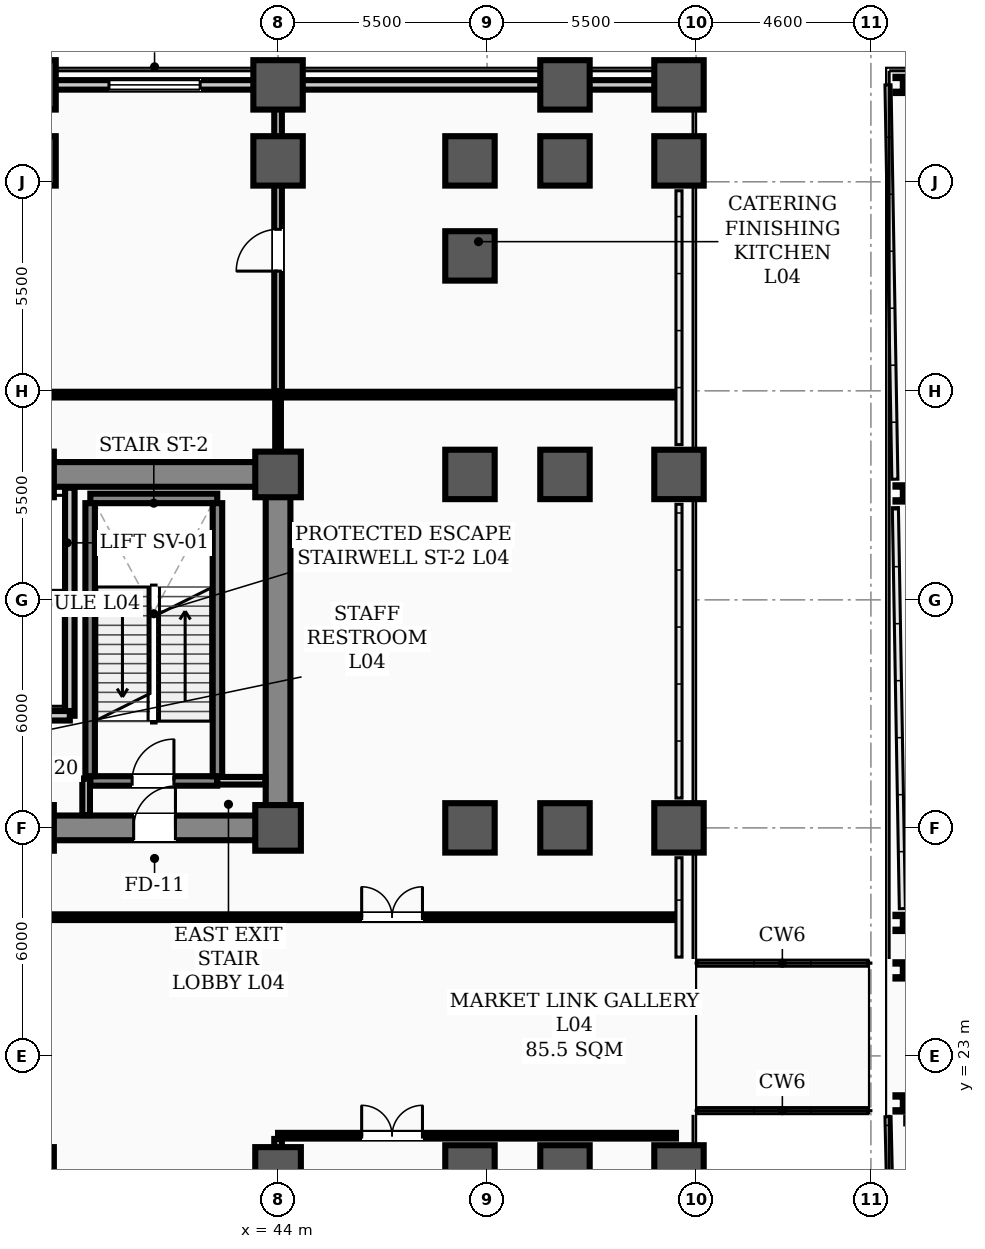
"""IFC4 building model, lengths in metres.
Left out: names, types, materials, properties, quantities, classifications, styles, units other than length and angle.
Written with IfcOpenShell. Run it as: python <this file> out.ifc"""

import sys

from ifc_helpers import new_model, si_unit, direction, frame, frame_2d, origin, origin_2d, place, context, subcontext, project, spatial, rectangle, hollow_rectangle, i_section, extrude, element, fill, save


model = new_model("IFC4")
c1 = context("Model", 3, precision=1e-05, world=origin(), true_north=direction((0.0, 1.0)))
c2 = subcontext(c1, "Body", "Model", "MODEL_VIEW")
j1 = project(units=[si_unit("LENGTHUNIT", "METRE"), si_unit("PLANEANGLEUNIT", "RADIAN")], contexts=[c1])
p1 = place(None, origin())
s1 = spatial("IfcSite", under=j1, at=p1, CompositionType="ELEMENT")
p2 = place(p1, origin())
s2 = spatial("IfcBuilding", under=s1, at=p2, CompositionType="ELEMENT")
p3 = place(p2, frame((0.0, 0.0, 16.6)))
s3 = spatial("IfcBuildingStorey", under=s2, at=p3, CompositionType="ELEMENT", Elevation=16.6)
for number, where, z_axis, x_axis in (
    (1, (37.5, 29.0, 0.0), (0.0, 0.0, 1.0), (1.0, 0.0, 0.0)),
    (2, (37.5, 38.3, 0.0), (0.0, 0.0, 1.0), (1.0, 0.0, 0.0)),
    (3, (44.0, 29.0, 0.0), (0.0, 0.0, 1.0), (1.0, 0.0, 0.0)),
    (4, (44.0, 38.3, 0.0), (0.0, 0.0, 1.0), (1.0, 0.0, 0.0)),
    (5, (37.5, 20.0, 0.0), (0.0, 0.0, 1.0), (1.0, 0.0, 0.0)),
    (6, (44.0, 20.0, 0.0), (0.0, 0.0, 1.0), (1.0, 0.0, 0.0)),
):
    element("IfcColumn", number, at=place(p3, frame(where, z_axis=z_axis, x_axis=x_axis)), inside=s3, PredefinedType="COLUMN", context=c2, shape_type="SweptSolid", body=[
        extrude(hollow_rectangle(XDim=1.2, YDim=1.2, WallThickness=0.04, InnerFilletRadius=0.02, OuterFilletRadius=0.06, at=origin_2d()), origin(), (0.0, 0.0, 1.0), 5.4),
    ])
p4 = place(p3, frame((37.5, 46.55, 0.0), z_axis=(0.0, 0.0, 1.0), x_axis=(1.0, 0.0, 0.0)))
e7 = element("IfcColumn", 7, at=p4, inside=s3, PredefinedType="COLUMN", context=c2, shape_type="SweptSolid", body=[
    extrude(rectangle(XDim=1.3, YDim=1.3, at=origin_2d()), origin(), (0.0, 0.0, 1.0), 5.4),
])
p5 = place(p3, frame((37.5, 48.55, 0.0), z_axis=(0.0, 0.0, 1.0), x_axis=(1.0, 0.0, 0.0)))
e8 = element("IfcColumn", 8, at=p5, inside=s3, PredefinedType="COLUMN", context=c2, shape_type="SweptSolid", body=[
    extrude(rectangle(XDim=1.3, YDim=1.3, at=origin_2d()), origin(), (0.0, 0.0, 1.0), 5.16),
])
p6 = place(p3, frame((44.0, 46.55, 0.0), z_axis=(0.0, 0.0, 1.0), x_axis=(1.0, 0.0, 0.0)))
e9 = element("IfcColumn", 9, at=p6, inside=s3, PredefinedType="COLUMN", context=c2, shape_type="SweptSolid", body=[
    extrude(rectangle(XDim=1.3, YDim=1.3, at=origin_2d()), origin(), (0.0, 0.0, 1.0), 5.4),
])
p7 = place(p3, frame((44.0, 48.55, 0.0), z_axis=(0.0, 0.0, 1.0), x_axis=(1.0, 0.0, 0.0)))
e10 = element("IfcColumn", 10, at=p7, inside=s3, PredefinedType="COLUMN", context=c2, shape_type="SweptSolid", body=[
    extrude(rectangle(XDim=1.3, YDim=1.3, at=origin_2d()), origin(), (0.0, 0.0, 1.0), 5.16),
])
for number, where, z_axis, x_axis in (
    (11, (49.05, 20.0, 0.0), (0.0, 0.0, 1.0), (1.0, 0.0, 0.0)),
    (12, (49.05, 29.0, 0.0), (0.0, 0.0, 1.0), (1.0, 0.0, 0.0)),
    (13, (49.05, 38.3, 0.0), (0.0, 0.0, 1.0), (1.0, 0.0, 0.0)),
    (14, (49.05, 44.05, 0.0), (0.0, 0.0, 1.0), (1.0, 0.0, 0.0)),
    (15, (49.05, 46.55, 0.0), (0.0, 0.0, 1.0), (1.0, 0.0, 0.0)),
    (16, (51.55, 20.0, 0.0), (0.0, 0.0, 1.0), (1.0, 0.0, 0.0)),
    (17, (51.55, 29.0, 0.0), (0.0, 0.0, 1.0), (1.0, 0.0, 0.0)),
    (18, (51.55, 38.3, 0.0), (0.0, 0.0, 1.0), (1.0, 0.0, 0.0)),
    (19, (51.55, 46.55, 0.0), (0.0, 0.0, 1.0), (1.0, 0.0, 0.0)),
):
    element("IfcColumn", number, at=place(p3, frame(where, z_axis=z_axis, x_axis=x_axis)), inside=s3, PredefinedType="COLUMN", context=c2, shape_type="SweptSolid", body=[
        extrude(rectangle(XDim=1.3, YDim=1.3, at=origin_2d()), origin(), (0.0, 0.0, 1.0), 5.4),
    ])
for number, where, z_axis, x_axis in (
    (20, (51.55, 48.55, 0.0), (0.0, 0.0, 1.0), (1.0, 0.0, 0.0)),
    (21, (54.55, 20.0, 0.0), (0.0, 0.0, 1.0), (1.0, 0.0, 0.0)),
    (22, (54.55, 29.0, 0.0), (0.0, 0.0, 1.0), (1.0, 0.0, 0.0)),
    (23, (54.55, 38.3, 0.0), (0.0, 0.0, 1.0), (1.0, 0.0, 0.0)),
    (24, (54.55, 46.55, 0.0), (0.0, 0.0, 1.0), (1.0, 0.0, 0.0)),
    (25, (54.55, 48.55, 0.0), (0.0, 0.0, 1.0), (1.0, 0.0, 0.0)),
):
    element("IfcColumn", number, at=place(p3, frame(where, z_axis=z_axis, x_axis=x_axis)), inside=s3, PredefinedType="COLUMN", context=c2, shape_type="SweptSolid", body=[
        extrude(rectangle(XDim=1.3, YDim=1.3, at=origin_2d()), origin(), (0.0, 0.0, 1.0), 5.16),
    ])
for number, where, z_axis, x_axis in (
    (26, (60.45, 21.75, 0.0), (0.0, 0.0, 1.0), (1.0, 0.0, 0.0)),
    (27, (60.45, 25.25, 0.0), (0.0, 0.0, 1.0), (1.0, 0.0, 0.0)),
    (28, (60.45, 26.5, 0.0), (0.0, 0.0, 1.0), (1.0, 0.0, 0.0)),
    (29, (60.45, 37.8, 0.0), (0.0, 0.0, 1.0), (1.0, 0.0, 0.0)),
    (30, (60.45, 48.55, 0.0), (0.0, 0.0, 1.0), (1.0, 0.0, 0.0)),
):
    element("IfcColumn", number, at=place(p3, frame(where, z_axis=z_axis, x_axis=x_axis)), inside=s3, PredefinedType="COLUMN", context=c2, shape_type="SweptSolid", body=[
        extrude(i_section(OverallWidth=0.407, OverallDepth=0.428, WebThickness=0.02, FlangeThickness=0.035, FilletRadius=0.022, at=origin_2d()), origin(), (0.0, 0.0, 1.0), 5.4),
    ])
p8 = place(p3, frame((0.45, 48.55, 0.0), z_axis=(0.0, 0.0, 1.0), x_axis=(1.0, 0.0, 0.0)))
e31 = element("IfcWall", 31, at=p8, inside=s3, PredefinedType="STANDARD", context=c2, shape_type="SweptSolid", body=[
    extrude(rectangle(XDim=54.1, YDim=0.25, at=frame_2d((27.05, 0.0))), origin(), (0.0, 0.0, 1.0), 4.38),
])
p9 = place(p8, frame((7.25, 0.0, 0.9)))
e32 = element("IfcOpeningElement", 32, at=p9, cuts=e31, PredefinedType="OPENING", context=c2, shape_type="SweptSolid", body=[
    extrude(rectangle(XDim=3.0, YDim=2.2, at=frame_2d((1.5, 1.1))), frame((0.0, 0.135, 0.0), z_axis=(0.0, -1.0, 0.0), x_axis=(1.0, 0.0, 0.0)), (0.0, 0.0, 1.0), 0.27),
])
p10 = place(p8, frame((17.15, 0.0, 0.9)))
e33 = element("IfcOpeningElement", 33, at=p10, cuts=e31, PredefinedType="OPENING", context=c2, shape_type="SweptSolid", body=[
    extrude(rectangle(XDim=2.4, YDim=2.1, at=frame_2d((1.2, 1.05))), frame((0.0, 0.135, 0.0), z_axis=(0.0, -1.0, 0.0), x_axis=(1.0, 0.0, 0.0)), (0.0, 0.0, 1.0), 0.27),
])
p11 = place(p8, frame((32.6, 0.0, 0.9)))
e34 = element("IfcOpeningElement", 34, at=p11, cuts=e31, PredefinedType="OPENING", context=c2, shape_type="SweptSolid", body=[
    extrude(rectangle(XDim=2.4, YDim=2.1, at=frame_2d((1.2, 1.05))), frame((0.0, 0.135, 0.0), z_axis=(0.0, -1.0, 0.0), x_axis=(1.0, 0.0, 0.0)), (0.0, 0.0, 1.0), 0.27),
])
p12 = place(p8, frame((39.1, 0.0, 0.9)))
e35 = element("IfcOpeningElement", 35, at=p12, cuts=e31, PredefinedType="OPENING", context=c2, shape_type="SweptSolid", body=[
    extrude(rectangle(XDim=2.4, YDim=2.1, at=frame_2d((1.2, 1.05))), frame((0.0, 0.135, 0.0), z_axis=(0.0, -1.0, 0.0), x_axis=(1.0, 0.0, 0.0)), (0.0, 0.0, 1.0), 0.27),
])
p13 = place(p3, frame((60.45, 48.55, 0.0), z_axis=(0.0, 0.0, 1.0), x_axis=(1.0, 0.0, 0.0)))
e36 = element("IfcWall", 36, at=p13, inside=s3, PredefinedType="STANDARD", context=c2, shape_type="SweptSolid", body=[
    extrude(rectangle(XDim=16.7, YDim=0.25, at=frame_2d((8.35, 0.0))), origin(), (0.0, 0.0, 1.0), 4.51),
])
p14 = place(p13, frame((2.85, 0.0, 0.95)))
e37 = element("IfcOpeningElement", 37, at=p14, cuts=e36, PredefinedType="OPENING", context=c2, shape_type="SweptSolid", body=[
    extrude(rectangle(XDim=2.0, YDim=1.8, at=frame_2d((1.0, 0.9))), frame((0.0, 0.135, 0.0), z_axis=(0.0, -1.0, 0.0), x_axis=(1.0, 0.0, 0.0)), (0.0, 0.0, 1.0), 0.27),
])
p15 = place(p13, frame((11.35, 0.0, 0.95)))
e38 = element("IfcOpeningElement", 38, at=p15, cuts=e36, PredefinedType="OPENING", context=c2, shape_type="SweptSolid", body=[
    extrude(rectangle(XDim=2.0, YDim=1.8, at=frame_2d((1.0, 0.9))), frame((0.0, 0.135, 0.0), z_axis=(0.0, -1.0, 0.0), x_axis=(1.0, 0.0, 0.0)), (0.0, 0.0, 1.0), 0.27),
])
p16 = place(p3, frame((13.5, 29.0, 0.0), z_axis=(0.0, 0.0, 1.0), x_axis=(1.0, 0.0, 0.0)))
e39 = element("IfcWall", 39, at=p16, inside=s3, PredefinedType="SHEAR", context=c2, shape_type="SweptSolid", body=[
    extrude(rectangle(XDim=30.5, YDim=0.65, at=frame_2d((15.25, 0.0))), origin(), (0.0, 0.0, 1.0), 5.16),
])
p17 = place(p16, frame((1.75, 0.0, 0.0)))
e40 = element("IfcOpeningElement", 40, at=p17, cuts=e39, PredefinedType="OPENING", context=c2, shape_type="SweptSolid", body=[
    extrude(rectangle(XDim=1.1, YDim=2.08, at=frame_2d((0.55, 1.04))), frame((0.0, 0.335, 0.0), z_axis=(0.0, -1.0, 0.0), x_axis=(1.0, 0.0, 0.0)), (0.0, 0.0, 1.0), 0.67),
])
p18 = place(p16, frame((26.7, 0.0, 0.0)))
e41 = element("IfcOpeningElement", 41, at=p18, cuts=e39, PredefinedType="OPENING", context=c2, shape_type="SweptSolid", body=[
    extrude(rectangle(XDim=1.1, YDim=2.08, at=frame_2d((0.55, 1.04))), frame((0.0, 0.335, 0.0), z_axis=(0.0, -1.0, 0.0), x_axis=(1.0, 0.0, 0.0)), (0.0, 0.0, 1.0), 0.67),
])
p19 = place(p16, frame((6.8, 0.0, 0.0)))
e42 = element("IfcOpeningElement", 42, at=p19, cuts=e39, PredefinedType="OPENING", context=c2, shape_type="SweptSolid", body=[
    extrude(rectangle(XDim=1.1, YDim=2.08, at=frame_2d((0.55, 1.04))), frame((0.0, 0.335, 0.0), z_axis=(0.0, -1.0, 0.0), x_axis=(1.0, 0.0, 0.0)), (0.0, 0.0, 1.0), 0.67),
])
p20 = place(p16, frame((13.2, 0.0, 0.0)))
e43 = element("IfcOpeningElement", 43, at=p20, cuts=e39, PredefinedType="OPENING", context=c2, shape_type="SweptSolid", body=[
    extrude(rectangle(XDim=1.6, YDim=2.08, at=frame_2d((0.8, 1.04))), frame((0.0, 0.335, 0.0), z_axis=(0.0, -1.0, 0.0), x_axis=(1.0, 0.0, 0.0)), (0.0, 0.0, 1.0), 0.67),
])
p21 = place(p16, frame((19.53, 0.0, 0.0)))
e44 = element("IfcOpeningElement", 44, at=p21, cuts=e39, PredefinedType="OPENING", context=c2, shape_type="SweptSolid", body=[
    extrude(rectangle(XDim=0.9, YDim=2.08, at=frame_2d((0.45, 1.04))), frame((0.0, 0.335, 0.0), z_axis=(0.0, -1.0, 0.0), x_axis=(1.0, 0.0, 0.0)), (0.0, 0.0, 1.0), 0.67),
])
p22 = place(p16, frame((21.57, 0.0, 0.0)))
e45 = element("IfcOpeningElement", 45, at=p22, cuts=e39, PredefinedType="OPENING", context=c2, shape_type="SweptSolid", body=[
    extrude(rectangle(XDim=0.9, YDim=2.08, at=frame_2d((0.45, 1.04))), frame((0.0, 0.335, 0.0), z_axis=(0.0, -1.0, 0.0), x_axis=(1.0, 0.0, 0.0)), (0.0, 0.0, 1.0), 0.67),
])
p23 = place(p3, frame((13.5, 38.3, 0.0), z_axis=(0.0, 0.0, 1.0), x_axis=(1.0, 0.0, 0.0)))
e46 = element("IfcWall", 46, at=p23, inside=s3, PredefinedType="SHEAR", context=c2, shape_type="SweptSolid", body=[
    extrude(rectangle(XDim=30.5, YDim=0.65, at=frame_2d((15.25, 0.0))), origin(), (0.0, 0.0, 1.0), 5.16),
])
p24 = place(p3, frame((44.0, 29.35, 0.0), z_axis=(0.0, 0.0, 1.0), x_axis=(0.0, 1.0, 0.0)))
e47 = element("IfcWall", 47, at=p24, inside=s3, PredefinedType="SHEAR", context=c2, shape_type="SweptSolid", body=[
    extrude(rectangle(XDim=8.6, YDim=0.65, at=frame_2d((4.3, 0.0))), origin(), (0.0, 0.0, 1.0), 5.16),
])
p25 = place(p3, frame((39.06, 30.235, 0.0), z_axis=(0.0, 0.0, 1.0), x_axis=(1.0, 0.0, 0.0)))
e48 = element("IfcWall", 48, at=p25, inside=s3, PredefinedType="STANDARD", context=c2, shape_type="SweptSolid", body=[
    extrude(rectangle(XDim=3.34, YDim=0.25, at=frame_2d((1.67, 0.0))), origin(), (0.0, 0.0, 1.0), 5.16),
])
p26 = place(p25, frame((1.1, 0.0, 0.0)))
e49 = element("IfcOpeningElement", 49, at=p26, cuts=e48, PredefinedType="OPENING", context=c2, shape_type="SweptSolid", body=[
    extrude(rectangle(XDim=1.1, YDim=2.08, at=frame_2d((0.55, 1.04))), frame((0.0, 0.135, 0.0), z_axis=(0.0, -1.0, 0.0), x_axis=(1.0, 0.0, 0.0)), (0.0, 0.0, 1.0), 0.27),
])
p27 = place(p3, frame((39.06, 37.669, 0.0), z_axis=(0.0, 0.0, 1.0), x_axis=(1.0, 0.0, 0.0)))
e50 = element("IfcWall", 50, at=p27, inside=s3, PredefinedType="STANDARD", context=c2, shape_type="SweptSolid", body=[
    extrude(rectangle(XDim=3.34, YDim=0.25, at=frame_2d((1.67, 0.0))), origin(), (0.0, 0.0, 1.0), 5.16),
])
for number, where, z_axis, x_axis in (
    (51, (39.055, 30.36, 0.0), (0.0, 0.0, 1.0), (0.0, 1.0, 0.0)),
    (52, (42.405, 30.36, 0.0), (0.0, 0.0, 1.0), (0.0, 1.0, 0.0)),
):
    element("IfcWall", number, at=place(p3, frame(where, z_axis=z_axis, x_axis=x_axis)), inside=s3, PredefinedType="STANDARD", context=c2, shape_type="SweptSolid", body=[
        extrude(rectangle(XDim=7.184, YDim=0.25, at=frame_2d((3.592, 0.0))), origin(), (0.0, 0.0, 1.0), 5.16),
    ])
p28 = place(p3, frame((38.52, 31.95, 0.0), z_axis=(0.0, 0.0, 1.0), x_axis=(0.0, 1.0, 0.0)))
e53 = element("IfcWall", 53, at=p28, inside=s3, PredefinedType="STANDARD", context=c2, shape_type="SweptSolid", body=[
    extrude(rectangle(XDim=6.0, YDim=0.25, at=frame_2d((3.0, 0.0))), origin(), (0.0, 0.0, 1.0), 3.74),
])
p29 = place(p3, frame((36.62, 31.95, 0.0), z_axis=(0.0, 0.0, 1.0), x_axis=(1.0, 0.0, 0.0)))
e54 = element("IfcWall", 54, at=p29, inside=s3, PredefinedType="STANDARD", context=c2, shape_type="SweptSolid", body=[
    extrude(rectangle(XDim=1.9, YDim=0.25, at=frame_2d((0.95, 0.0))), origin(), (0.0, 0.0, 1.0), 4.98),
])
p30 = place(p3, frame((0.58, 26.65, 0.0), z_axis=(0.0, 0.0, 1.0), x_axis=(1.0, 0.0, 0.0)))
e55 = element("IfcWall", 55, at=p30, inside=s3, PredefinedType="PARTITIONING", context=c2, shape_type="SweptSolid", body=[
    extrude(rectangle(XDim=53.89, YDim=0.15, at=frame_2d((26.945, 0.0))), origin(), (0.0, 0.0, 1.0), 3.74),
])
p31 = place(p30, frame((17.12, 0.0, 0.0)))
e56 = element("IfcOpeningElement", 56, at=p31, cuts=e55, PredefinedType="OPENING", context=c2, shape_type="SweptSolid", body=[
    extrude(rectangle(XDim=1.6, YDim=2.08, at=frame_2d((0.8, 1.04))), frame((0.0, 0.085, 0.0), z_axis=(0.0, -1.0, 0.0), x_axis=(1.0, 0.0, 0.0)), (0.0, 0.0, 1.0), 0.17),
])
p32 = place(p30, frame((32.87, 0.0, 0.0)))
e57 = element("IfcOpeningElement", 57, at=p32, cuts=e55, PredefinedType="OPENING", context=c2, shape_type="SweptSolid", body=[
    extrude(rectangle(XDim=1.6, YDim=2.08, at=frame_2d((0.8, 1.04))), frame((0.0, 0.085, 0.0), z_axis=(0.0, -1.0, 0.0), x_axis=(1.0, 0.0, 0.0)), (0.0, 0.0, 1.0), 0.17),
])
p33 = place(p30, frame((45.62, 0.0, 0.0)))
e58 = element("IfcOpeningElement", 58, at=p33, cuts=e55, PredefinedType="OPENING", context=c2, shape_type="SweptSolid", body=[
    extrude(rectangle(XDim=1.6, YDim=2.08, at=frame_2d((0.8, 1.04))), frame((0.0, 0.085, 0.0), z_axis=(0.0, -1.0, 0.0), x_axis=(1.0, 0.0, 0.0)), (0.0, 0.0, 1.0), 0.17),
])
p34 = place(p3, frame((44.0, 20.9, 0.0), z_axis=(0.0, 0.0, 1.0), x_axis=(1.0, 0.0, 0.0)))
e59 = element("IfcWall", 59, at=p34, inside=s3, PredefinedType="PARTITIONING", context=c2, shape_type="SweptSolid", body=[
    extrude(rectangle(XDim=10.47, YDim=0.15, at=frame_2d((5.235, 0.0))), origin(), (0.0, 0.0, 1.0), 3.74),
])
p35 = place(p34, frame((2.2, 0.0, 0.0)))
e60 = element("IfcOpeningElement", 60, at=p35, cuts=e59, PredefinedType="OPENING", context=c2, shape_type="SweptSolid", body=[
    extrude(rectangle(XDim=1.6, YDim=2.08, at=frame_2d((0.8, 1.04))), frame((0.0, 0.085, 0.0), z_axis=(0.0, -1.0, 0.0), x_axis=(1.0, 0.0, 0.0)), (0.0, 0.0, 1.0), 0.17),
])
p36 = place(p3, frame((0.58, 40.4, 0.0), z_axis=(0.0, 0.0, 1.0), x_axis=(1.0, 0.0, 0.0)))
e61 = element("IfcWall", 61, at=p36, inside=s3, PredefinedType="PARTITIONING", context=c2, shape_type="SweptSolid", body=[
    extrude(rectangle(XDim=53.89, YDim=0.15, at=frame_2d((26.945, 0.0))), origin(), (0.0, 0.0, 1.0), 3.74),
])
p37 = place(p36, frame((17.12, 0.0, 0.0)))
e62 = element("IfcOpeningElement", 62, at=p37, cuts=e61, PredefinedType="OPENING", context=c2, shape_type="SweptSolid", body=[
    extrude(rectangle(XDim=1.6, YDim=2.08, at=frame_2d((0.8, 1.04))), frame((0.0, 0.085, 0.0), z_axis=(0.0, -1.0, 0.0), x_axis=(1.0, 0.0, 0.0)), (0.0, 0.0, 1.0), 0.17),
])
p38 = place(p36, frame((32.87, 0.0, 0.0)))
e63 = element("IfcOpeningElement", 63, at=p38, cuts=e61, PredefinedType="OPENING", context=c2, shape_type="SweptSolid", body=[
    extrude(rectangle(XDim=1.6, YDim=2.08, at=frame_2d((0.8, 1.04))), frame((0.0, 0.085, 0.0), z_axis=(0.0, -1.0, 0.0), x_axis=(1.0, 0.0, 0.0)), (0.0, 0.0, 1.0), 0.17),
])
p39 = place(p3, frame((42.4, 30.24, 0.0), z_axis=(0.0, 0.0, 1.0), x_axis=(1.0, 0.0, 0.0)))
e64 = element("IfcWall", 64, at=p39, inside=s3, PredefinedType="STANDARD", context=c2, shape_type="SweptSolid", body=[
    extrude(rectangle(XDim=1.265, YDim=0.2, at=frame_2d((0.633, 0.0))), origin(), (0.0, 0.0, 1.0), 3.74),
])
p40 = place(p3, frame((44.0, 3.53, 0.0), z_axis=(0.0, 0.0, 1.0), x_axis=(0.0, 1.0, 0.0)))
e65 = element("IfcWall", 65, at=p40, inside=s3, PredefinedType="STANDARD", context=c2, shape_type="SweptSolid", body=[
    extrude(rectangle(XDim=17.285, YDim=0.2, at=frame_2d((8.643, 0.0))), origin(), (0.0, 0.0, 1.0), 3.74),
])
p41 = place(p3, frame((44.0, 40.485, 0.0), z_axis=(0.0, 0.0, 1.0), x_axis=(0.0, 1.0, 0.0)))
e66 = element("IfcWall", 66, at=p41, inside=s3, PredefinedType="STANDARD", context=c2, shape_type="SweptSolid", body=[
    extrude(rectangle(XDim=7.935, YDim=0.2, at=frame_2d((3.967, 0.0))), origin(), (0.0, 0.0, 1.0), 3.74),
])
p42 = place(p41, frame((3.165, 0.0, 0.0)))
e67 = element("IfcOpeningElement", 67, at=p42, cuts=e66, PredefinedType="OPENING", context=c2, shape_type="SweptSolid", body=[
    extrude(rectangle(XDim=1.1, YDim=2.08, at=frame_2d((0.55, 1.04))), frame((0.0, 0.11, 0.0), z_axis=(0.0, -1.0, 0.0), x_axis=(1.0, 0.0, 0.0)), (0.0, 0.0, 1.0), 0.22),
])
p43 = place(p3, frame((44.0, 38.635, 0.0), z_axis=(0.0, 0.0, 1.0), x_axis=(0.0, 1.0, 0.0)))
e68 = element("IfcWall", 68, at=p43, inside=s3, PredefinedType="PARTITIONING", context=c2, shape_type="SweptSolid", body=[
    extrude(rectangle(XDim=1.68, YDim=0.15, at=frame_2d((0.84, 0.0))), origin(), (0.0, 0.0, 1.0), 3.74),
])
p44 = place(p3, frame((38.95, 29.335, 0.0), z_axis=(0.0, 0.0, 1.0), x_axis=(0.0, 1.0, 0.0)))
e69 = element("IfcWall", 69, at=p44, inside=s3, PredefinedType="STANDARD", context=c2, shape_type="SweptSolid", body=[
    extrude(rectangle(XDim=0.965, YDim=0.2, at=frame_2d((0.482, 0.0))), origin(), (0.0, 0.0, 1.0), 3.74),
])
p45 = place(p12, origin())
e70 = element("IfcWindow", 70, at=p45, inside=s3, PartitioningType="SINGLE_PANEL", PredefinedType="WINDOW", context=c2, shape_type="SweptSolid", body=[
    extrude(rectangle(XDim=2.4, YDim=2.1, at=frame_2d((1.2, 1.05))), frame((0.0, 0.03, 0.0), z_axis=(0.0, -1.0, 0.0), x_axis=(1.0, 0.0, 0.0)), (0.0, 0.0, 1.0), 0.06),
])
fill(e35, e70)
p46 = place(p26, origin())
e71 = element("IfcDoor", 71, at=p46, inside=s3, OperationType="SINGLE_SWING_RIGHT", PredefinedType="DOOR", context=c2, shape_type="SweptSolid", body=[
    extrude(rectangle(XDim=1.1, YDim=2.08, at=frame_2d((0.55, 1.04))), frame((0.0, 0.025, 0.0), z_axis=(0.0, -1.0, 0.0), x_axis=(1.0, 0.0, 0.0)), (0.0, 0.0, 1.0), 0.05),
])
fill(e49, e71)
p47 = place(p35, origin())
e72 = element("IfcDoor", 72, at=p47, inside=s3, OperationType="DOUBLE_DOOR_SINGLE_SWING", PredefinedType="DOOR", context=c2, shape_type="SweptSolid", body=[
    extrude(rectangle(XDim=1.6, YDim=2.08, at=frame_2d((0.8, 1.04))), frame((0.0, 0.025, 0.0), z_axis=(0.0, -1.0, 0.0), x_axis=(1.0, 0.0, 0.0)), (0.0, 0.0, 1.0), 0.05),
])
fill(e60, e72)
p48 = place(p33, origin())
e73 = element("IfcDoor", 73, at=p48, inside=s3, OperationType="DOUBLE_DOOR_SINGLE_SWING", PredefinedType="DOOR", context=c2, shape_type="SweptSolid", body=[
    extrude(rectangle(XDim=1.6, YDim=2.08, at=frame_2d((0.8, 1.04))), frame((0.0, 0.025, 0.0), z_axis=(0.0, -1.0, 0.0), x_axis=(1.0, 0.0, 0.0)), (0.0, 0.0, 1.0), 0.05),
])
fill(e58, e73)
p49 = place(p42, origin())
e74 = element("IfcDoor", 74, at=p49, inside=s3, OperationType="SINGLE_SWING_LEFT", PredefinedType="DOOR", context=c2, shape_type="SweptSolid", body=[
    extrude(rectangle(XDim=1.1, YDim=2.08, at=frame_2d((0.55, 1.04))), frame((0.0, 0.025, 0.0), z_axis=(0.0, -1.0, 0.0), x_axis=(1.0, 0.0, 0.0)), (0.0, 0.0, 1.0), 0.05),
])
fill(e67, e74)
p50 = place(p18, origin())
e75 = element("IfcDoor", 75, at=p50, inside=s3, OperationType="SINGLE_SWING_RIGHT", PredefinedType="DOOR", context=c2, shape_type="SweptSolid", body=[
    extrude(rectangle(XDim=1.1, YDim=2.08, at=frame_2d((0.55, 1.04))), frame((0.0, 0.025, 0.0), z_axis=(0.0, -1.0, 0.0), x_axis=(1.0, 0.0, 0.0)), (0.0, 0.0, 1.0), 0.05),
])
fill(e41, e75)
save(model, sys.argv[1])
